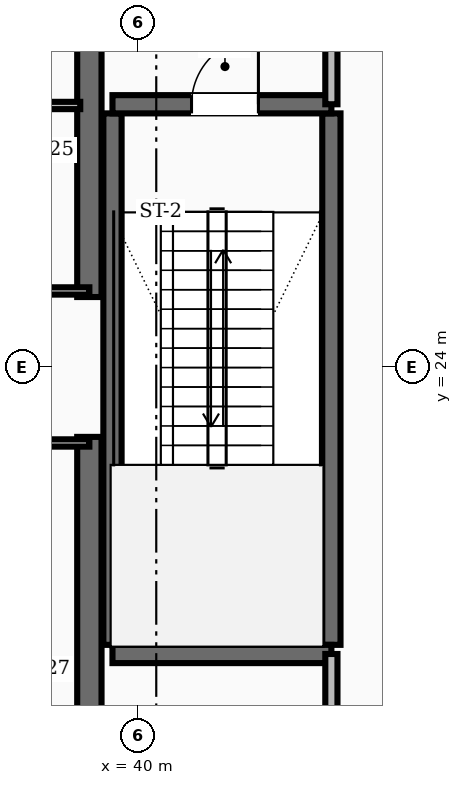
"""IFC4 building model, lengths in metres.
Left out: names, types, materials, properties, quantities, classifications, styles, units other than length and angle.
Written with IfcOpenShell. Run it as: python <this file> out.ifc"""

import sys

from ifc_helpers import new_model, si_unit, direction, frame, frame_2d, origin, place, context, subcontext, project, spatial, rectangle, extrude, element, fill, save


model = new_model("IFC4")
c1 = context("Model", 3, precision=1e-05, world=origin(), true_north=direction((0.0, 1.0)))
c2 = subcontext(c1, "Body", "Model", "MODEL_VIEW")
j1 = project(units=[si_unit("LENGTHUNIT", "METRE"), si_unit("PLANEANGLEUNIT", "RADIAN")], contexts=[c1])
p1 = place(None, origin())
s1 = spatial("IfcSite", under=j1, at=p1, CompositionType="ELEMENT")
p2 = place(p1, origin())
s2 = spatial("IfcBuilding", under=s1, at=p2, CompositionType="ELEMENT")
p3 = place(p2, frame((0.0, 0.0, 19.6)))
s3 = spatial("IfcBuildingStorey", under=s2, at=p3, CompositionType="ELEMENT", Elevation=19.6)
for number, where, z_axis, x_axis in (
    (1, (39.2, 16.55, 0.0), (0.0, 0.0, 1.0), (0.0, 1.0, 0.0)),
    (2, (39.2, 25.15, 0.0), (0.0, 0.0, 1.0), (0.0, 1.0, 0.0)),
):
    element("IfcWall", number, at=place(p3, frame(where, z_axis=z_axis, x_axis=x_axis)), inside=s3, PredefinedType="SHEAR", context=c2, shape_type="SweptSolid", body=[
        extrude(rectangle(XDim=6.3, YDim=0.4, at=frame_2d((3.15, 0.0))), origin(), (0.0, 0.0, 1.0), 4.8),
    ])
for number, where, z_axis, x_axis in (
    (3, (43.18, 19.43, 0.0), (0.0, 0.0, 1.0), (0.0, 1.0, 0.0)),
    (4, (39.58, 19.43, 0.0), (0.0, 0.0, 1.0), (0.0, 1.0, 0.0)),
):
    element("IfcWall", number, at=place(p3, frame(where, z_axis=z_axis, x_axis=x_axis)), inside=s3, PredefinedType="SHEAR", context=c2, shape_type="SweptSolid", body=[
        extrude(rectangle(XDim=8.74, YDim=0.3, at=frame_2d((4.37, 0.0))), origin(), (0.0, 0.0, 1.0), 4.8),
    ])
p4 = place(p3, frame((39.58, 19.28, 0.0), z_axis=(0.0, 0.0, 1.0), x_axis=(1.0, 0.0, 0.0)))
e5 = element("IfcWall", 5, at=p4, inside=s3, PredefinedType="SHEAR", context=c2, shape_type="SweptSolid", body=[
    extrude(rectangle(XDim=3.6, YDim=0.3, at=frame_2d((1.8, 0.0))), origin(), (0.0, 0.0, 1.0), 4.8),
])
p5 = place(p3, frame((39.58, 28.32, 0.0), z_axis=(0.0, 0.0, 1.0), x_axis=(1.0, 0.0, 0.0)))
e6 = element("IfcWall", 6, at=p5, inside=s3, PredefinedType="SHEAR", context=c2, shape_type="SweptSolid", body=[
    extrude(rectangle(XDim=3.6, YDim=0.3, at=frame_2d((1.8, 0.0))), origin(), (0.0, 0.0, 1.0), 4.8),
])
p6 = place(p5, frame((1.3, 0.0, 0.0)))
e7 = element("IfcOpeningElement", 7, at=p6, cuts=e6, PredefinedType="OPENING", context=c2, shape_type="SweptSolid", body=[
    extrude(rectangle(XDim=1.1, YDim=2.1, at=frame_2d((0.55, 1.05))), frame((0.0, 0.16, 0.0), z_axis=(0.0, -1.0, 0.0), x_axis=(1.0, 0.0, 0.0)), (0.0, 0.0, 1.0), 0.32),
])
p7 = place(p3, frame((43.18, 28.32, 0.0), z_axis=(0.0, 0.0, 1.0), x_axis=(0.0, 1.0, 0.0)))
e8 = element("IfcWall", 8, at=p7, inside=s3, PredefinedType="SOLIDWALL", context=c2, shape_type="SweptSolid", body=[
    extrude(rectangle(XDim=3.13, YDim=0.2, at=frame_2d((1.565, 0.0))), origin(), (0.0, 0.0, 1.0), 3.42),
])
p8 = place(p7, frame((1.015, 0.0, 0.0)))
e9 = element("IfcOpeningElement", 9, at=p8, cuts=e8, PredefinedType="OPENING", context=c2, shape_type="SweptSolid", body=[
    extrude(rectangle(XDim=1.1, YDim=2.1, at=frame_2d((0.55, 1.05))), frame((0.0, 0.11, 0.0), z_axis=(0.0, -1.0, 0.0), x_axis=(1.0, 0.0, 0.0)), (0.0, 0.0, 1.0), 0.22),
])
p9 = place(p3, frame((43.18, 16.55, 0.0), z_axis=(0.0, 0.0, 1.0), x_axis=(0.0, 1.0, 0.0)))
e10 = element("IfcWall", 10, at=p9, inside=s3, PredefinedType="SOLIDWALL", context=c2, shape_type="SweptSolid", body=[
    extrude(rectangle(XDim=2.73, YDim=0.2, at=frame_2d((1.365, 0.0))), origin(), (0.0, 0.0, 1.0), 3.42),
])
p10 = place(p9, frame((0.89, 0.0, 0.0)))
e11 = element("IfcOpeningElement", 11, at=p10, cuts=e10, PredefinedType="OPENING", context=c2, shape_type="SweptSolid", body=[
    extrude(rectangle(XDim=0.95, YDim=2.1, at=frame_2d((0.475, 1.05))), frame((0.0, 0.11, 0.0), z_axis=(0.0, -1.0, 0.0), x_axis=(1.0, 0.0, 0.0)), (0.0, 0.0, 1.0), 0.22),
])
for number, where, z_axis, x_axis in (
    (12, (37.4, 25.25, 0.0), (0.0, 0.0, 1.0), (1.0, 0.0, 0.0)),
    (13, (37.4, 22.75, 0.0), (0.0, 0.0, 1.0), (1.0, 0.0, 0.0)),
):
    element("IfcWall", number, at=place(p3, frame(where, z_axis=z_axis, x_axis=x_axis)), inside=s3, PredefinedType="PARTITIONING", context=c2, shape_type="SweptSolid", body=[
        extrude(rectangle(XDim=1.8, YDim=0.12, at=frame_2d((0.9, 0.0))), origin(), (0.0, 0.0, 1.0), 3.42),
    ])
p11 = place(p3, frame((37.4, 28.3, 0.0), z_axis=(0.0, 0.0, 1.0), x_axis=(1.0, 0.0, 0.0)))
e14 = element("IfcWall", 14, at=p11, inside=s3, PredefinedType="PARTITIONING", context=c2, shape_type="SweptSolid", body=[
    extrude(rectangle(XDim=1.65, YDim=0.12, at=frame_2d((0.825, 0.0))), origin(), (0.0, 0.0, 1.0), 3.42),
])
p12 = place(p6, origin())
e15 = element("IfcDoor", 15, at=p12, inside=s3, OperationType="SINGLE_SWING_RIGHT", PredefinedType="DOOR", context=c2, shape_type="SweptSolid", body=[
    extrude(rectangle(XDim=1.1, YDim=2.1, at=frame_2d((0.55, 1.05))), frame((0.0, 0.025, 0.0), z_axis=(0.0, -1.0, 0.0), x_axis=(1.0, 0.0, 0.0)), (0.0, 0.0, 1.0), 0.05),
])
fill(e7, e15)
save(model, sys.argv[1])
